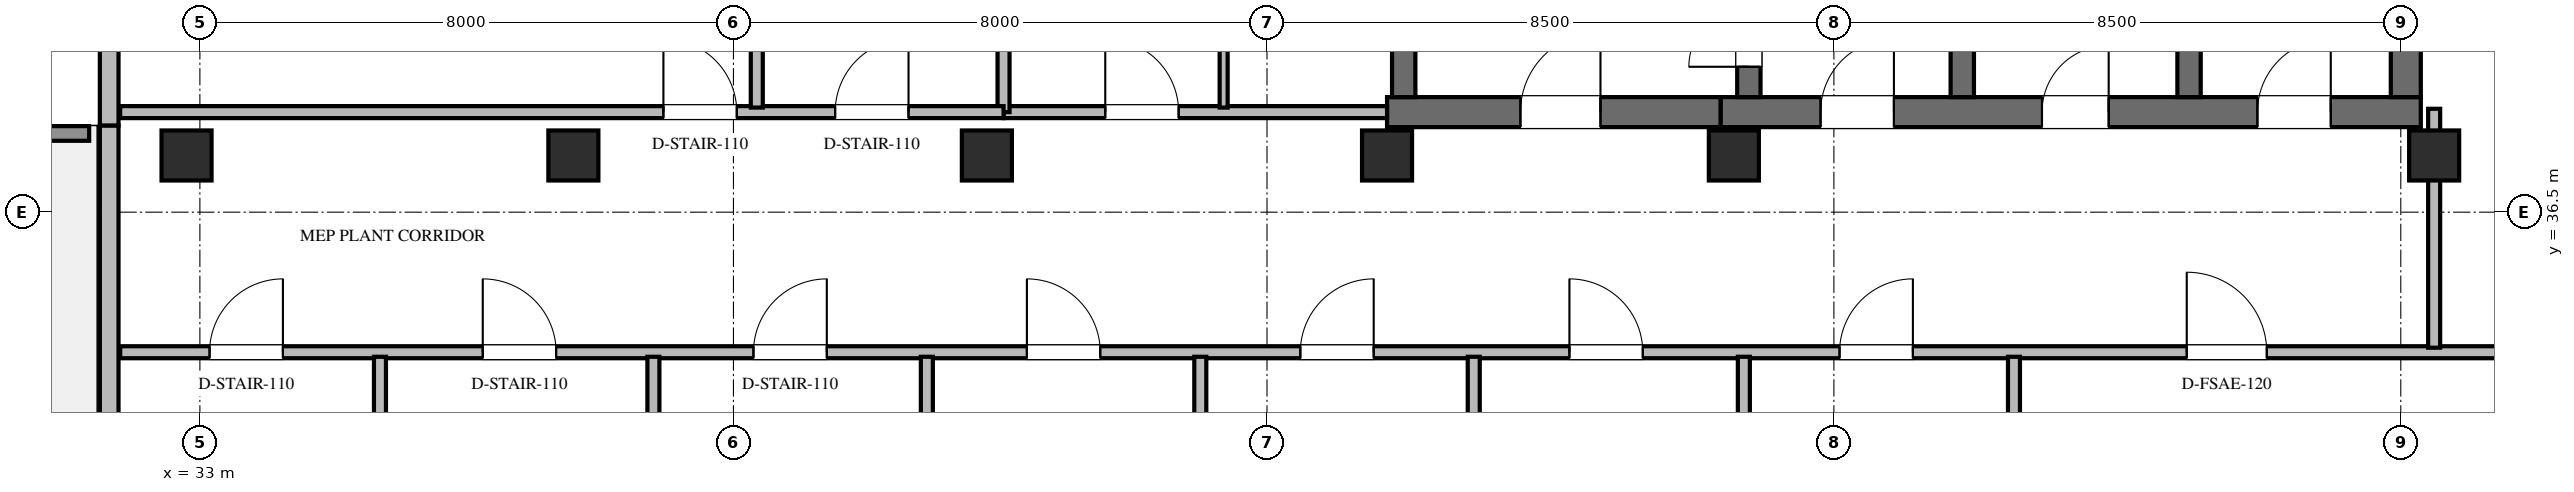
"""IFC4 building model, lengths in metres.
Left out: names, types, materials, properties, quantities, classifications, styles, units other than length and angle.
Written with IfcOpenShell. Run it as: python <this file> out.ifc"""

import sys

from ifc_helpers import new_model, si_unit, direction, frame, frame_2d, origin, origin_2d, place, context, subcontext, project, spatial, rectangle, extrude, element, fill, save


model = new_model("IFC4")
c1 = context("Model", 3, precision=1e-05, world=origin(), true_north=direction((0.0, 1.0)))
c2 = subcontext(c1, "Body", "Model", "MODEL_VIEW")
j1 = project(units=[si_unit("LENGTHUNIT", "METRE"), si_unit("PLANEANGLEUNIT", "RADIAN")], contexts=[c1])
p1 = place(None, origin())
s1 = spatial("IfcSite", under=j1, at=p1, CompositionType="ELEMENT")
p2 = place(p1, origin())
s2 = spatial("IfcBuilding", under=s1, at=p2, CompositionType="ELEMENT")
p3 = place(p2, frame((0.0, 0.0, 277.8)))
s3 = spatial("IfcBuildingStorey", under=s2, at=p3, CompositionType="ELEMENT", Elevation=277.8)
p4 = place(p3, frame((55.8, 38.0, 0.0), z_axis=(0.0, 0.0, 1.0), x_axis=(1.0, 0.0, 0.0)))
e1 = element("IfcWall", 1, at=p4, inside=s3, PredefinedType="SHEAR", context=c2, shape_type="SweptSolid", body=[
    extrude(rectangle(XDim=10.5, YDim=0.45, at=frame_2d((5.25, 0.0))), origin(), (0.0, 0.0, 1.0), 4.5),
])
p5 = place(p4, frame((1.5, 0.0, 0.0)))
e2 = element("IfcOpeningElement", 2, at=p5, cuts=e1, PredefinedType="OPENING", context=c2, shape_type="SweptSolid", body=[
    extrude(rectangle(XDim=1.1, YDim=2.2, at=frame_2d((0.55, 1.1))), frame((0.0, 0.235, 0.0), z_axis=(0.0, -1.0, 0.0), x_axis=(1.0, 0.0, 0.0)), (0.0, 0.0, 1.0), 0.47),
])
p6 = place(p4, frame((4.82, 0.0, 0.0)))
e3 = element("IfcOpeningElement", 3, at=p6, cuts=e1, PredefinedType="OPENING", context=c2, shape_type="SweptSolid", body=[
    extrude(rectangle(XDim=1.0, YDim=2.15, at=frame_2d((0.5, 1.075))), frame((0.0, 0.235, 0.0), z_axis=(0.0, -1.0, 0.0), x_axis=(1.0, 0.0, 0.0)), (0.0, 0.0, 1.0), 0.47),
])
p7 = place(p4, frame((8.05, 0.0, 0.0)))
e4 = element("IfcOpeningElement", 4, at=p7, cuts=e1, PredefinedType="OPENING", context=c2, shape_type="SweptSolid", body=[
    extrude(rectangle(XDim=1.1, YDim=2.2, at=frame_2d((0.55, 1.1))), frame((0.0, 0.235, 0.0), z_axis=(0.0, -1.0, 0.0), x_axis=(1.0, 0.0, 0.0)), (0.0, 0.0, 1.0), 0.47),
])
p8 = place(p3, frame((66.075, 38.225, 0.0), z_axis=(0.0, 0.0, 1.0), x_axis=(0.0, 1.0, 0.0)))
e5 = element("IfcWall", 5, at=p8, inside=s3, PredefinedType="SHEAR", context=c2, shape_type="SweptSolid", body=[
    extrude(rectangle(XDim=8.525, YDim=0.45, at=frame_2d((4.262, 0.0))), origin(), (0.0, 0.0, 1.0), 4.5),
])
for number, where, z_axis, x_axis in (
    (6, (62.825, 38.225, 0.0), (0.0, 0.0, 1.0), (0.0, 1.0, 0.0)),
    (7, (59.425, 38.225, 0.0), (0.0, 0.0, 1.0), (0.0, 1.0, 0.0)),
):
    element("IfcWall", number, at=place(p3, frame(where, z_axis=z_axis, x_axis=x_axis)), inside=s3, PredefinedType="SHEAR", context=c2, shape_type="SweptSolid", body=[
        extrude(rectangle(XDim=8.525, YDim=0.35, at=frame_2d((4.262, 0.0))), origin(), (0.0, 0.0, 1.0), 4.5),
    ])
p9 = place(p3, frame((56.225, 38.225, 0.0), z_axis=(0.0, 0.0, 1.0), x_axis=(0.0, 1.0, 0.0)))
e8 = element("IfcWall", 8, at=p9, inside=s3, PredefinedType="SHEAR", context=c2, shape_type="SweptSolid", body=[
    extrude(rectangle(XDim=8.525, YDim=0.35, at=frame_2d((4.262, 0.0))), origin(), (0.0, 0.0, 1.0), 4.5),
])
p10 = place(p9, frame((0.455, 0.0, 0.0)))
e9 = element("IfcOpeningElement", 9, at=p10, cuts=e8, PredefinedType="OPENING", context=c2, shape_type="SweptSolid", body=[
    extrude(rectangle(XDim=0.9, YDim=2.15, at=frame_2d((0.45, 1.075))), frame((0.0, 0.185, 0.0), z_axis=(0.0, -1.0, 0.0), x_axis=(1.0, 0.0, 0.0)), (0.0, 0.0, 1.0), 0.37),
])
p11 = place(p3, frame((50.8, 38.0, 0.0), z_axis=(0.0, 0.0, 1.0), x_axis=(1.0, 0.0, 0.0)))
e10 = element("IfcWall", 10, at=p11, inside=s3, PredefinedType="SHEAR", context=c2, shape_type="SweptSolid", body=[
    extrude(rectangle(XDim=5.0, YDim=0.45, at=frame_2d((2.5, 0.0))), origin(), (0.0, 0.0, 1.0), 4.5),
])
p12 = place(p11, frame((2.0, 0.0, 0.0)))
e11 = element("IfcOpeningElement", 11, at=p12, cuts=e10, PredefinedType="OPENING", context=c2, shape_type="SweptSolid", body=[
    extrude(rectangle(XDim=1.2, YDim=2.2, at=frame_2d((0.6, 1.1))), frame((0.0, 0.235, 0.0), z_axis=(0.0, -1.0, 0.0), x_axis=(1.0, 0.0, 0.0)), (0.0, 0.0, 1.0), 0.47),
])
p13 = place(p3, frame((51.05, 38.225, 0.0), z_axis=(0.0, 0.0, 1.0), x_axis=(0.0, 1.0, 0.0)))
e12 = element("IfcWall", 12, at=p13, inside=s3, PredefinedType="SHEAR", context=c2, shape_type="SweptSolid", body=[
    extrude(rectangle(XDim=8.525, YDim=0.35, at=frame_2d((4.262, 0.0))), origin(), (0.0, 0.0, 1.0), 4.5),
])
for number, where, z_axis, x_axis in (
    (13, (66.5, 37.35, 0.0), (0.0, 0.0, 1.0), (1.0, 0.0, 0.0)),
    (14, (56.0, 37.35, 0.0), (0.0, 0.0, 1.0), (1.0, 0.0, 0.0)),
    (15, (50.8, 37.35, 0.0), (0.0, 0.0, 1.0), (1.0, 0.0, 0.0)),
    (16, (44.8, 37.35, 0.0), (0.0, 0.0, 1.0), (1.0, 0.0, 0.0)),
    (17, (38.6, 37.35, 0.0), (0.0, 0.0, 1.0), (1.0, 0.0, 0.0)),
    (18, (32.8, 37.35, 0.0), (0.0, 0.0, 1.0), (1.0, 0.0, 0.0)),
):
    element("IfcColumn", number, at=place(p3, frame(where, z_axis=z_axis, x_axis=x_axis)), inside=s3, PredefinedType="COLUMN", context=c2, shape_type="SweptSolid", body=[
        extrude(rectangle(XDim=0.75, YDim=0.75, at=origin_2d()), origin(), (0.0, 0.0, 1.0), 4.5),
    ])
p14 = place(p3, frame((28.12, 37.68, 0.0), z_axis=(0.0, 0.0, 1.0), x_axis=(1.0, 0.0, 0.0)))
e19 = element("IfcWall", 19, at=p14, inside=s3, PredefinedType="PARAPET", context=c2, shape_type="SweptSolid", body=[
    extrude(rectangle(XDim=3.22, YDim=0.22, at=frame_2d((1.61, 0.0))), origin(), (0.0, 0.0, 1.0), 1.2),
])
p15 = place(p3, frame((31.64, 20.198, 0.0), z_axis=(0.0, 0.0, 1.0), x_axis=(0.0, 1.0, 0.0)))
e20 = element("IfcWall", 20, at=p15, inside=s3, PredefinedType="STANDARD", context=c2, shape_type="SweptSolid", body=[
    extrude(rectangle(XDim=17.602, YDim=0.28, at=frame_2d((8.801, 0.0))), origin(), (0.0, 0.0, 1.0), 4.265),
])
p16 = place(p3, frame((31.64, 37.8, 0.0), z_axis=(0.0, 0.0, 1.0), x_axis=(0.0, 1.0, 0.0)))
e21 = element("IfcWall", 21, at=p16, inside=s3, PredefinedType="STANDARD", context=c2, shape_type="SweptSolid", body=[
    extrude(rectangle(XDim=8.642, YDim=0.28, at=frame_2d((4.321, 0.0))), origin(), (0.0, 0.0, 1.0), 4.265),
])
p17 = place(p3, frame((68.355, 37.8, 0.0), z_axis=(0.0, 0.0, 1.0), x_axis=(-0.139183833681, -0.990266560297, 0.0)))
e22 = element("IfcWall", 22, at=p17, inside=s3, PredefinedType="STANDARD", context=c2, shape_type="SweptSolid", body=[
    extrude(rectangle(XDim=16.913, YDim=0.28, at=frame_2d((8.457, 0.0))), origin(), (0.0, 0.0, 1.0), 4.265),
])
p18 = place(p3, frame((45.05, 38.0, 0.0), z_axis=(0.0, 0.0, 1.0), x_axis=(1.0, 0.0, 0.0)))
e23 = element("IfcWall", 23, at=p18, inside=s3, PredefinedType="STANDARD", context=c2, shape_type="SweptSolid", body=[
    extrude(rectangle(XDim=5.75, YDim=0.18, at=frame_2d((2.875, 0.0))), origin(), (0.0, 0.0, 1.0), 3.654),
])
p19 = place(p18, frame((1.525, 0.0, 0.0)))
e24 = element("IfcOpeningElement", 24, at=p19, cuts=e23, PredefinedType="OPENING", context=c2, shape_type="SweptSolid", body=[
    extrude(rectangle(XDim=1.1, YDim=2.2, at=frame_2d((0.55, 1.1))), frame((0.0, 0.1, 0.0), z_axis=(0.0, -1.0, 0.0), x_axis=(1.0, 0.0, 0.0)), (0.0, 0.0, 1.0), 0.2),
])
p20 = place(p3, frame((48.35, 38.068, 0.0), z_axis=(0.0, 0.0, 1.0), x_axis=(0.0, 1.0, 0.0)))
e25 = element("IfcWall", 25, at=p20, inside=s3, PredefinedType="PARTITIONING", context=c2, shape_type="SweptSolid", body=[
    extrude(rectangle(XDim=3.732, YDim=0.12, at=frame_2d((1.866, 0.0))), origin(), (0.0, 0.0, 1.0), 4.265),
])
p21 = place(p20, frame((1.407, 0.0, 0.0)))
e26 = element("IfcOpeningElement", 26, at=p21, cuts=e25, PredefinedType="OPENING", context=c2, shape_type="SweptSolid", body=[
    extrude(rectangle(XDim=0.85, YDim=2.1, at=frame_2d((0.425, 1.05))), frame((0.0, 0.07, 0.0), z_axis=(0.0, -1.0, 0.0), x_axis=(1.0, 0.0, 0.0)), (0.0, 0.0, 1.0), 0.14),
])
p22 = place(p3, frame((45.05, 38.0, 0.0), z_axis=(0.0, 0.0, 1.0), x_axis=(0.0, 1.0, 0.0)))
e27 = element("IfcWall", 27, at=p22, inside=s3, PredefinedType="STANDARD", context=c2, shape_type="SweptSolid", body=[
    extrude(rectangle(XDim=5.875, YDim=0.18, at=frame_2d((2.938, 0.0))), origin(), (0.0, 0.0, 1.0), 3.654),
])
p23 = place(p3, frame((31.805, 38.0, 0.0), z_axis=(0.0, 0.0, 1.0), x_axis=(1.0, 0.0, 0.0)))
e28 = element("IfcWall", 28, at=p23, inside=s3, PredefinedType="STANDARD", context=c2, shape_type="SweptSolid", body=[
    extrude(rectangle(XDim=13.245, YDim=0.18, at=frame_2d((6.623, 0.0))), origin(), (0.0, 0.0, 1.0), 3.654),
])
p24 = place(p23, frame((8.145, 0.0, 0.0)))
e29 = element("IfcOpeningElement", 29, at=p24, cuts=e28, PredefinedType="OPENING", context=c2, shape_type="SweptSolid", body=[
    extrude(rectangle(XDim=1.1, YDim=2.2, at=frame_2d((0.55, 1.1))), frame((0.0, 0.1, 0.0), z_axis=(0.0, -1.0, 0.0), x_axis=(1.0, 0.0, 0.0)), (0.0, 0.0, 1.0), 0.2),
])
p25 = place(p23, frame((10.72, 0.0, 0.0)))
e30 = element("IfcOpeningElement", 30, at=p25, cuts=e28, PredefinedType="OPENING", context=c2, shape_type="SweptSolid", body=[
    extrude(rectangle(XDim=1.1, YDim=2.2, at=frame_2d((0.55, 1.1))), frame((0.0, 0.1, 0.0), z_axis=(0.0, -1.0, 0.0), x_axis=(1.0, 0.0, 0.0)), (0.0, 0.0, 1.0), 0.2),
])
p26 = place(p3, frame((41.35, 38.068, 0.0), z_axis=(0.0, 0.0, 1.0), x_axis=(0.0, 1.0, 0.0)))
e31 = element("IfcWall", 31, at=p26, inside=s3, PredefinedType="STANDARD", context=c2, shape_type="SweptSolid", body=[
    extrude(rectangle(XDim=8.682, YDim=0.18, at=frame_2d((4.341, 0.0))), origin(), (0.0, 0.0, 1.0), 4.265),
])
p27 = place(p3, frame((31.805, 34.4, 0.0), z_axis=(0.0, 0.0, 1.0), x_axis=(1.0, 0.0, 0.0)))
e32 = element("IfcWall", 32, at=p27, inside=s3, PredefinedType="STANDARD", context=c2, shape_type="SweptSolid", body=[
    extrude(rectangle(XDim=35.906, YDim=0.18, at=frame_2d((17.953, 0.0))), origin(), (0.0, 0.0, 1.0), 3.654),
])
p28 = place(p27, frame((30.986, 0.0, 0.0)))
e33 = element("IfcOpeningElement", 33, at=p28, cuts=e32, PredefinedType="OPENING", context=c2, shape_type="SweptSolid", body=[
    extrude(rectangle(XDim=1.2, YDim=2.2, at=frame_2d((0.6, 1.1))), frame((0.0, 0.1, 0.0), z_axis=(0.0, -1.0, 0.0), x_axis=(1.0, 0.0, 0.0)), (0.0, 0.0, 1.0), 0.2),
])
p29 = place(p27, frame((1.34, 0.0, 0.0)))
e34 = element("IfcOpeningElement", 34, at=p29, cuts=e32, PredefinedType="OPENING", context=c2, shape_type="SweptSolid", body=[
    extrude(rectangle(XDim=1.1, YDim=2.2, at=frame_2d((0.55, 1.1))), frame((0.0, 0.1, 0.0), z_axis=(0.0, -1.0, 0.0), x_axis=(1.0, 0.0, 0.0)), (0.0, 0.0, 1.0), 0.2),
])
p30 = place(p27, frame((5.436, 0.0, 0.0)))
e35 = element("IfcOpeningElement", 35, at=p30, cuts=e32, PredefinedType="OPENING", context=c2, shape_type="SweptSolid", body=[
    extrude(rectangle(XDim=1.1, YDim=2.2, at=frame_2d((0.55, 1.1))), frame((0.0, 0.1, 0.0), z_axis=(0.0, -1.0, 0.0), x_axis=(1.0, 0.0, 0.0)), (0.0, 0.0, 1.0), 0.2),
])
p31 = place(p27, frame((9.495, 0.0, 0.0)))
e36 = element("IfcOpeningElement", 36, at=p31, cuts=e32, PredefinedType="OPENING", context=c2, shape_type="SweptSolid", body=[
    extrude(rectangle(XDim=1.1, YDim=2.2, at=frame_2d((0.55, 1.1))), frame((0.0, 0.1, 0.0), z_axis=(0.0, -1.0, 0.0), x_axis=(1.0, 0.0, 0.0)), (0.0, 0.0, 1.0), 0.2),
])
p32 = place(p27, frame((13.595, 0.0, 0.0)))
e37 = element("IfcOpeningElement", 37, at=p32, cuts=e32, PredefinedType="OPENING", context=c2, shape_type="SweptSolid", body=[
    extrude(rectangle(XDim=1.1, YDim=2.2, at=frame_2d((0.55, 1.1))), frame((0.0, 0.1, 0.0), z_axis=(0.0, -1.0, 0.0), x_axis=(1.0, 0.0, 0.0)), (0.0, 0.0, 1.0), 0.2),
])
p33 = place(p27, frame((17.695, 0.0, 0.0)))
e38 = element("IfcOpeningElement", 38, at=p33, cuts=e32, PredefinedType="OPENING", context=c2, shape_type="SweptSolid", body=[
    extrude(rectangle(XDim=1.1, YDim=2.2, at=frame_2d((0.55, 1.1))), frame((0.0, 0.1, 0.0), z_axis=(0.0, -1.0, 0.0), x_axis=(1.0, 0.0, 0.0)), (0.0, 0.0, 1.0), 0.2),
])
p34 = place(p27, frame((21.729, 0.0, 0.0)))
e39 = element("IfcOpeningElement", 39, at=p34, cuts=e32, PredefinedType="OPENING", context=c2, shape_type="SweptSolid", body=[
    extrude(rectangle(XDim=1.1, YDim=2.2, at=frame_2d((0.55, 1.1))), frame((0.0, 0.1, 0.0), z_axis=(0.0, -1.0, 0.0), x_axis=(1.0, 0.0, 0.0)), (0.0, 0.0, 1.0), 0.2),
])
p35 = place(p27, frame((25.78, 0.0, 0.0)))
e40 = element("IfcOpeningElement", 40, at=p35, cuts=e32, PredefinedType="OPENING", context=c2, shape_type="SweptSolid", body=[
    extrude(rectangle(XDim=1.1, YDim=2.2, at=frame_2d((0.55, 1.1))), frame((0.0, 0.1, 0.0), z_axis=(0.0, -1.0, 0.0), x_axis=(1.0, 0.0, 0.0)), (0.0, 0.0, 1.0), 0.2),
])
p36 = place(p3, frame((66.5, 34.468, 0.0), z_axis=(0.0, 0.0, 1.0), x_axis=(0.0, 1.0, 0.0)))
e41 = element("IfcWall", 41, at=p36, inside=s3, PredefinedType="STANDARD", context=c2, shape_type="SweptSolid", body=[
    extrude(rectangle(XDim=3.582, YDim=0.18, at=frame_2d((1.791, 0.0))), origin(), (0.0, 0.0, 1.0), 3.654),
])
p37 = place(p3, frame((60.2, 19.305, 0.0), z_axis=(0.0, 0.0, 1.0), x_axis=(0.0, 1.0, 0.0)))
e42 = element("IfcWall", 42, at=p37, inside=s3, PredefinedType="STANDARD", context=c2, shape_type="SweptSolid", body=[
    extrude(rectangle(XDim=15.027, YDim=0.18, at=frame_2d((7.514, 0.0))), origin(), (0.0, 0.0, 1.0), 3.654),
])
p38 = place(p3, frame((35.7, 20.03, 0.0), z_axis=(0.0, 0.0, 1.0), x_axis=(0.0, 1.0, 0.0)))
e43 = element("IfcWall", 43, at=p38, inside=s3, PredefinedType="STANDARD", context=c2, shape_type="SweptSolid", body=[
    extrude(rectangle(XDim=14.302, YDim=0.18, at=frame_2d((7.151, 0.0))), origin(), (0.0, 0.0, 1.0), 3.654),
])
p39 = place(p3, frame((39.8, 25.425, 0.0), z_axis=(0.0, 0.0, 1.0), x_axis=(0.0, 1.0, 0.0)))
e44 = element("IfcWall", 44, at=p39, inside=s3, PredefinedType="STANDARD", context=c2, shape_type="SweptSolid", body=[
    extrude(rectangle(XDim=8.907, YDim=0.18, at=frame_2d((4.454, 0.0))), origin(), (0.0, 0.0, 1.0), 3.654),
])
p40 = place(p3, frame((43.9, 30.82, 0.0), z_axis=(0.0, 0.0, 1.0), x_axis=(0.0, 1.0, 0.0)))
e45 = element("IfcWall", 45, at=p40, inside=s3, PredefinedType="STANDARD", context=c2, shape_type="SweptSolid", body=[
    extrude(rectangle(XDim=3.512, YDim=0.18, at=frame_2d((1.756, 0.0))), origin(), (0.0, 0.0, 1.0), 3.654),
])
p41 = place(p3, frame((48.0, 27.793, 0.0), z_axis=(0.0, 0.0, 1.0), x_axis=(0.0, 1.0, 0.0)))
e46 = element("IfcWall", 46, at=p41, inside=s3, PredefinedType="STANDARD", context=c2, shape_type="SweptSolid", body=[
    extrude(rectangle(XDim=6.539, YDim=0.18, at=frame_2d((3.269, 0.0))), origin(), (0.0, 0.0, 1.0), 3.654),
])
p42 = place(p3, frame((52.1, 22.399, 0.0), z_axis=(0.0, 0.0, 1.0), x_axis=(0.0, 1.0, 0.0)))
e47 = element("IfcWall", 47, at=p42, inside=s3, PredefinedType="STANDARD", context=c2, shape_type="SweptSolid", body=[
    extrude(rectangle(XDim=11.933, YDim=0.18, at=frame_2d((5.967, 0.0))), origin(), (0.0, 0.0, 1.0), 3.654),
])
p43 = place(p3, frame((56.15, 19.305, 0.0), z_axis=(0.0, 0.0, 1.0), x_axis=(0.0, 1.0, 0.0)))
e48 = element("IfcWall", 48, at=p43, inside=s3, PredefinedType="STANDARD", context=c2, shape_type="SweptSolid", body=[
    extrude(rectangle(XDim=15.027, YDim=0.18, at=frame_2d((7.514, 0.0))), origin(), (0.0, 0.0, 1.0), 3.654),
])
p44 = place(p5, origin())
e49 = element("IfcDoor", 49, at=p44, inside=s3, OperationType="SINGLE_SWING_RIGHT", PredefinedType="DOOR", context=c2, shape_type="SweptSolid", body=[
    extrude(rectangle(XDim=1.1, YDim=2.2, at=frame_2d((0.55, 1.1))), frame((0.0, 0.025, 0.0), z_axis=(0.0, -1.0, 0.0), x_axis=(1.0, 0.0, 0.0)), (0.0, 0.0, 1.0), 0.05),
])
fill(e2, e49)
p45 = place(p6, origin())
e50 = element("IfcDoor", 50, at=p45, inside=s3, OperationType="SINGLE_SWING_RIGHT", PredefinedType="DOOR", context=c2, shape_type="SweptSolid", body=[
    extrude(rectangle(XDim=1.0, YDim=2.15, at=frame_2d((0.5, 1.075))), frame((0.0, 0.025, 0.0), z_axis=(0.0, -1.0, 0.0), x_axis=(1.0, 0.0, 0.0)), (0.0, 0.0, 1.0), 0.05),
])
fill(e3, e50)
p46 = place(p7, origin())
e51 = element("IfcDoor", 51, at=p46, inside=s3, OperationType="SINGLE_SWING_RIGHT", PredefinedType="DOOR", context=c2, shape_type="SweptSolid", body=[
    extrude(rectangle(XDim=1.1, YDim=2.2, at=frame_2d((0.55, 1.1))), frame((0.0, 0.025, 0.0), z_axis=(0.0, -1.0, 0.0), x_axis=(1.0, 0.0, 0.0)), (0.0, 0.0, 1.0), 0.05),
])
fill(e4, e51)
p47 = place(p12, origin())
e52 = element("IfcDoor", 52, at=p47, inside=s3, OperationType="SINGLE_SWING_RIGHT", PredefinedType="DOOR", context=c2, shape_type="SweptSolid", body=[
    extrude(rectangle(XDim=1.2, YDim=2.2, at=frame_2d((0.6, 1.1))), frame((0.0, 0.025, 0.0), z_axis=(0.0, -1.0, 0.0), x_axis=(1.0, 0.0, 0.0)), (0.0, 0.0, 1.0), 0.05),
])
fill(e11, e52)
p48 = place(p10, origin())
e53 = element("IfcDoor", 53, at=p48, inside=s3, OperationType="SINGLE_SWING_LEFT", PredefinedType="DOOR", context=c2, shape_type="SweptSolid", body=[
    extrude(rectangle(XDim=0.9, YDim=2.15, at=frame_2d((0.45, 1.075))), frame((0.0, 0.025, 0.0), z_axis=(0.0, -1.0, 0.0), x_axis=(1.0, 0.0, 0.0)), (0.0, 0.0, 1.0), 0.05),
])
fill(e9, e53)
p49 = place(p19, origin())
e54 = element("IfcDoor", 54, at=p49, inside=s3, OperationType="SINGLE_SWING_LEFT", PredefinedType="DOOR", context=c2, shape_type="SweptSolid", body=[
    extrude(rectangle(XDim=1.1, YDim=2.2, at=frame_2d((0.55, 1.1))), frame((0.0, 0.025, 0.0), z_axis=(0.0, -1.0, 0.0), x_axis=(1.0, 0.0, 0.0)), (0.0, 0.0, 1.0), 0.05),
])
fill(e24, e54)
p50 = place(p24, origin())
e55 = element("IfcDoor", 55, at=p50, inside=s3, OperationType="SINGLE_SWING_LEFT", PredefinedType="DOOR", context=c2, shape_type="SweptSolid", body=[
    extrude(rectangle(XDim=1.1, YDim=2.2, at=frame_2d((0.55, 1.1))), frame((0.0, 0.025, 0.0), z_axis=(0.0, -1.0, 0.0), x_axis=(1.0, 0.0, 0.0)), (0.0, 0.0, 1.0), 0.05),
])
fill(e29, e55)
p51 = place(p25, origin())
e56 = element("IfcDoor", 56, at=p51, inside=s3, OperationType="SINGLE_SWING_RIGHT", PredefinedType="DOOR", context=c2, shape_type="SweptSolid", body=[
    extrude(rectangle(XDim=1.1, YDim=2.2, at=frame_2d((0.55, 1.1))), frame((0.0, 0.025, 0.0), z_axis=(0.0, -1.0, 0.0), x_axis=(1.0, 0.0, 0.0)), (0.0, 0.0, 1.0), 0.05),
])
fill(e30, e56)
p52 = place(p28, origin())
e57 = element("IfcDoor", 57, at=p52, inside=s3, OperationType="SINGLE_SWING_LEFT", PredefinedType="DOOR", context=c2, shape_type="SweptSolid", body=[
    extrude(rectangle(XDim=1.2, YDim=2.2, at=frame_2d((0.6, 1.1))), frame((0.0, 0.025, 0.0), z_axis=(0.0, -1.0, 0.0), x_axis=(1.0, 0.0, 0.0)), (0.0, 0.0, 1.0), 0.05),
])
fill(e33, e57)
p53 = place(p29, origin())
e58 = element("IfcDoor", 58, at=p53, inside=s3, OperationType="SINGLE_SWING_RIGHT", PredefinedType="DOOR", context=c2, shape_type="SweptSolid", body=[
    extrude(rectangle(XDim=1.1, YDim=2.2, at=frame_2d((0.55, 1.1))), frame((0.0, 0.025, 0.0), z_axis=(0.0, -1.0, 0.0), x_axis=(1.0, 0.0, 0.0)), (0.0, 0.0, 1.0), 0.05),
])
fill(e34, e58)
p54 = place(p30, origin())
e59 = element("IfcDoor", 59, at=p54, inside=s3, OperationType="SINGLE_SWING_LEFT", PredefinedType="DOOR", context=c2, shape_type="SweptSolid", body=[
    extrude(rectangle(XDim=1.1, YDim=2.2, at=frame_2d((0.55, 1.1))), frame((0.0, 0.025, 0.0), z_axis=(0.0, -1.0, 0.0), x_axis=(1.0, 0.0, 0.0)), (0.0, 0.0, 1.0), 0.05),
])
fill(e35, e59)
p55 = place(p31, origin())
e60 = element("IfcDoor", 60, at=p55, inside=s3, OperationType="SINGLE_SWING_RIGHT", PredefinedType="DOOR", context=c2, shape_type="SweptSolid", body=[
    extrude(rectangle(XDim=1.1, YDim=2.2, at=frame_2d((0.55, 1.1))), frame((0.0, 0.025, 0.0), z_axis=(0.0, -1.0, 0.0), x_axis=(1.0, 0.0, 0.0)), (0.0, 0.0, 1.0), 0.05),
])
fill(e36, e60)
p56 = place(p32, origin())
e61 = element("IfcDoor", 61, at=p56, inside=s3, OperationType="SINGLE_SWING_LEFT", PredefinedType="DOOR", context=c2, shape_type="SweptSolid", body=[
    extrude(rectangle(XDim=1.1, YDim=2.2, at=frame_2d((0.55, 1.1))), frame((0.0, 0.025, 0.0), z_axis=(0.0, -1.0, 0.0), x_axis=(1.0, 0.0, 0.0)), (0.0, 0.0, 1.0), 0.05),
])
fill(e37, e61)
p57 = place(p33, origin())
e62 = element("IfcDoor", 62, at=p57, inside=s3, OperationType="SINGLE_SWING_RIGHT", PredefinedType="DOOR", context=c2, shape_type="SweptSolid", body=[
    extrude(rectangle(XDim=1.1, YDim=2.2, at=frame_2d((0.55, 1.1))), frame((0.0, 0.025, 0.0), z_axis=(0.0, -1.0, 0.0), x_axis=(1.0, 0.0, 0.0)), (0.0, 0.0, 1.0), 0.05),
])
fill(e38, e62)
p58 = place(p34, origin())
e63 = element("IfcDoor", 63, at=p58, inside=s3, OperationType="SINGLE_SWING_LEFT", PredefinedType="DOOR", context=c2, shape_type="SweptSolid", body=[
    extrude(rectangle(XDim=1.1, YDim=2.2, at=frame_2d((0.55, 1.1))), frame((0.0, 0.025, 0.0), z_axis=(0.0, -1.0, 0.0), x_axis=(1.0, 0.0, 0.0)), (0.0, 0.0, 1.0), 0.05),
])
fill(e39, e63)
p59 = place(p35, origin())
e64 = element("IfcDoor", 64, at=p59, inside=s3, OperationType="SINGLE_SWING_RIGHT", PredefinedType="DOOR", context=c2, shape_type="SweptSolid", body=[
    extrude(rectangle(XDim=1.1, YDim=2.2, at=frame_2d((0.55, 1.1))), frame((0.0, 0.025, 0.0), z_axis=(0.0, -1.0, 0.0), x_axis=(1.0, 0.0, 0.0)), (0.0, 0.0, 1.0), 0.05),
])
fill(e40, e64)
save(model, sys.argv[1])
